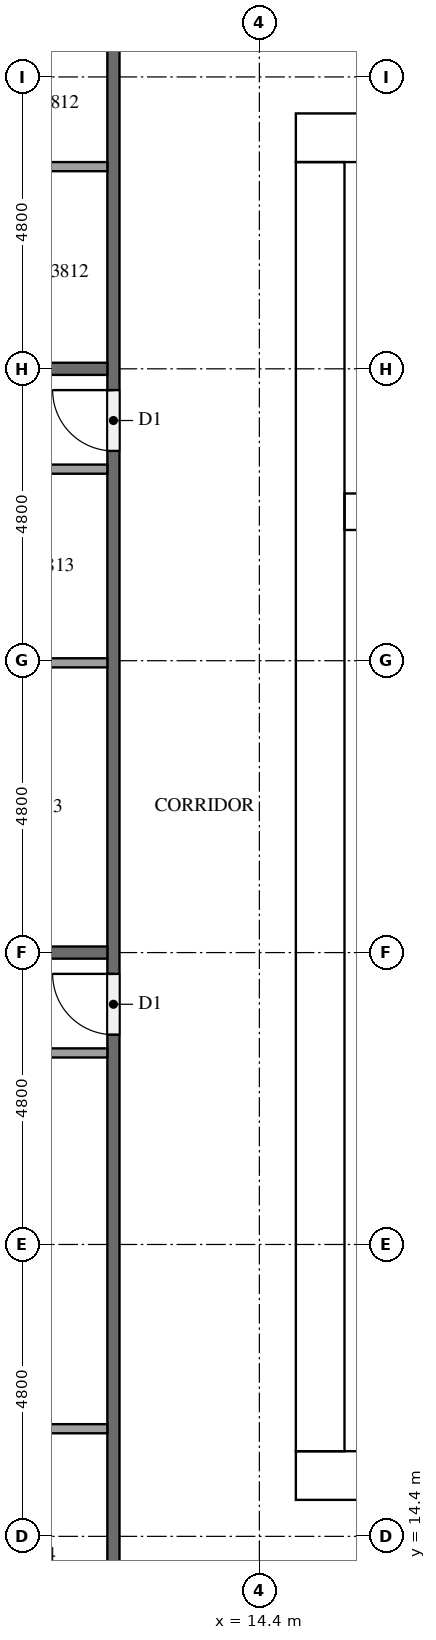
"""IFC4 building model, lengths in metres.
Left out: names, types, materials, properties, quantities, classifications, styles, units other than length and angle.
Written with IfcOpenShell. Run it as: python <this file> out.ifc"""

import sys

from ifc_helpers import new_model, si_unit, direction, frame, frame_2d, origin, place, context, subcontext, project, spatial, rectangle, extrude, element, fill, save


model = new_model("IFC4")
c1 = context("Model", 3, precision=1e-05, world=origin(), true_north=direction((0.0, 1.0)))
c2 = subcontext(c1, "Body", "Model", "MODEL_VIEW")
j1 = project(units=[si_unit("LENGTHUNIT", "METRE"), si_unit("PLANEANGLEUNIT", "RADIAN")], contexts=[c1])
p1 = place(None, origin())
s1 = spatial("IfcSite", under=j1, at=p1, CompositionType="ELEMENT")
p2 = place(p1, origin())
s2 = spatial("IfcBuilding", under=s1, at=p2, CompositionType="ELEMENT")
p3 = place(p2, frame((0.0, 0.0, 149.0)))
s3 = spatial("IfcBuildingStorey", under=s2, at=p3, CompositionType="ELEMENT", Elevation=149.0)
p4 = place(p3, frame((15.0, 15.4, 0.0), z_axis=(0.0, 0.0, 1.0), x_axis=(1.0, 0.0, 0.0)))
e1 = element("IfcWall", 1, at=p4, inside=s3, PredefinedType="SHEAR", context=c2, shape_type="SweptSolid", body=[
    extrude(rectangle(XDim=32.4, YDim=0.8, at=frame_2d((16.2, 0.0))), origin(), (0.0, 0.0, 1.0), 3.2),
])
p5 = place(p4, frame((15.3, 0.0, 0.0)))
e2 = element("IfcOpeningElement", 2, at=p5, cuts=e1, PredefinedType="OPENING", context=c2, shape_type="SweptSolid", body=[
    extrude(rectangle(XDim=1.8, YDim=2.1, at=frame_2d((0.9, 1.05))), frame((0.0, 0.41, 0.0), z_axis=(0.0, -1.0, 0.0), x_axis=(1.0, 0.0, 0.0)), (0.0, 0.0, 1.0), 0.82),
])
p6 = place(p3, frame((15.0, 37.4, 0.0), z_axis=(0.0, 0.0, 1.0), x_axis=(1.0, 0.0, 0.0)))
e3 = element("IfcWall", 3, at=p6, inside=s3, PredefinedType="SHEAR", context=c2, shape_type="SweptSolid", body=[
    extrude(rectangle(XDim=32.4, YDim=0.8, at=frame_2d((16.2, 0.0))), origin(), (0.0, 0.0, 1.0), 3.2),
])
p7 = place(p6, frame((15.3, 0.0, 0.0)))
e4 = element("IfcOpeningElement", 4, at=p7, cuts=e3, PredefinedType="OPENING", context=c2, shape_type="SweptSolid", body=[
    extrude(rectangle(XDim=1.8, YDim=2.1, at=frame_2d((0.9, 1.05))), frame((0.0, 0.41, 0.0), z_axis=(0.0, -1.0, 0.0), x_axis=(1.0, 0.0, 0.0)), (0.0, 0.0, 1.0), 0.82),
])
p8 = place(p6, frame((1.51, 0.0, 0.0)))
e5 = element("IfcOpeningElement", 5, at=p8, cuts=e3, PredefinedType="OPENING", context=c2, shape_type="SweptSolid", body=[
    extrude(rectangle(XDim=1.0, YDim=2.1, at=frame_2d((0.5, 1.05))), frame((0.0, 0.41, 0.0), z_axis=(0.0, -1.0, 0.0), x_axis=(1.0, 0.0, 0.0)), (0.0, 0.0, 1.0), 0.82),
])
p9 = place(p6, frame((5.11, 0.0, 0.0)))
e6 = element("IfcOpeningElement", 6, at=p9, cuts=e3, PredefinedType="OPENING", context=c2, shape_type="SweptSolid", body=[
    extrude(rectangle(XDim=1.0, YDim=2.1, at=frame_2d((0.5, 1.05))), frame((0.0, 0.41, 0.0), z_axis=(0.0, -1.0, 0.0), x_axis=(1.0, 0.0, 0.0)), (0.0, 0.0, 1.0), 0.82),
])
p10 = place(p3, frame((15.4, 15.8, 0.0), z_axis=(0.0, 0.0, 1.0), x_axis=(0.0, 1.0, 0.0)))
e7 = element("IfcWall", 7, at=p10, inside=s3, PredefinedType="SHEAR", context=c2, shape_type="SweptSolid", body=[
    extrude(rectangle(XDim=21.2, YDim=0.8, at=frame_2d((10.6, 0.0))), origin(), (0.0, 0.0, 1.0), 3.2),
])
p11 = place(p10, frame((4.96, 0.0, 0.0)))
e8 = element("IfcOpeningElement", 8, at=p11, cuts=e7, PredefinedType="OPENING", context=c2, shape_type="SweptSolid", body=[
    extrude(rectangle(XDim=1.2, YDim=2.1, at=frame_2d((0.6, 1.05))), frame((0.0, 0.41, 0.0), z_axis=(0.0, -1.0, 0.0), x_axis=(1.0, 0.0, 0.0)), (0.0, 0.0, 1.0), 0.82),
])
p12 = place(p3, frame((15.8, 31.25, 0.0), z_axis=(0.0, 0.0, 1.0), x_axis=(1.0, 0.0, 0.0)))
e9 = element("IfcWall", 9, at=p12, inside=s3, PredefinedType="SHEAR", context=c2, shape_type="SweptSolid", body=[
    extrude(rectangle(XDim=7.0, YDim=0.6, at=frame_2d((3.5, 0.0))), origin(), (0.0, 0.0, 1.0), 3.2),
])
p13 = place(p3, frame((12.0, 12.1, 0.0), z_axis=(0.0, 0.0, 1.0), x_axis=(0.0, 1.0, 0.0)))
e10 = element("IfcWall", 10, at=p13, inside=s3, PredefinedType="PARTITIONING", context=c2, shape_type="SweptSolid", body=[
    extrude(rectangle(XDim=28.6, YDim=0.2, at=frame_2d((14.3, 0.0))), origin(), (0.0, 0.0, 1.0), 3.2),
])
p14 = place(p13, frame((27.35, 0.0, 0.0)))
e11 = element("IfcOpeningElement", 11, at=p14, cuts=e10, PredefinedType="OPENING", context=c2, shape_type="SweptSolid", body=[
    extrude(rectangle(XDim=1.0, YDim=2.1, at=frame_2d((0.5, 1.05))), frame((0.0, 0.11, 0.0), z_axis=(0.0, -1.0, 0.0), x_axis=(1.0, 0.0, 0.0)), (0.0, 0.0, 1.0), 0.22),
])
p15 = place(p13, frame((20.15, 0.0, 0.0)))
e12 = element("IfcOpeningElement", 12, at=p15, cuts=e10, PredefinedType="OPENING", context=c2, shape_type="SweptSolid", body=[
    extrude(rectangle(XDim=1.0, YDim=2.1, at=frame_2d((0.5, 1.05))), frame((0.0, 0.11, 0.0), z_axis=(0.0, -1.0, 0.0), x_axis=(1.0, 0.0, 0.0)), (0.0, 0.0, 1.0), 0.22),
])
p16 = place(p13, frame((10.55, 0.0, 0.0)))
e13 = element("IfcOpeningElement", 13, at=p16, cuts=e10, PredefinedType="OPENING", context=c2, shape_type="SweptSolid", body=[
    extrude(rectangle(XDim=1.0, YDim=2.1, at=frame_2d((0.5, 1.05))), frame((0.0, 0.11, 0.0), z_axis=(0.0, -1.0, 0.0), x_axis=(1.0, 0.0, 0.0)), (0.0, 0.0, 1.0), 0.22),
])
for number, where, z_axis, x_axis in (
    (14, (0.375, 33.6, 0.0), (0.0, 0.0, 1.0), (1.0, 0.0, 0.0)),
    (15, (0.375, 24.0, 0.0), (0.0, 0.0, 1.0), (1.0, 0.0, 0.0)),
):
    element("IfcWall", number, at=place(p3, frame(where, z_axis=z_axis, x_axis=x_axis)), inside=s3, PredefinedType="PARTITIONING", context=c2, shape_type="SweptSolid", body=[
        extrude(rectangle(XDim=11.525, YDim=0.2, at=frame_2d((5.762, 0.0))), origin(), (0.0, 0.0, 1.0), 3.2),
    ])
p17 = place(p3, frame((11.9, 36.925, 0.0), z_axis=(0.0, 0.0, 1.0), x_axis=(-1.0, 0.0, 0.0)))
e16 = element("IfcWall", 16, at=p17, inside=s3, PredefinedType="PARTITIONING", context=c2, shape_type="SweptSolid", body=[
    extrude(rectangle(XDim=3.725, YDim=0.15, at=frame_2d((1.862, 0.0))), origin(), (0.0, 0.0, 1.0), 3.2),
])
p18 = place(p3, frame((11.9, 28.765, 0.0), z_axis=(0.0, 0.0, 1.0), x_axis=(-1.0, 0.0, 0.0)))
e17 = element("IfcWall", 17, at=p18, inside=s3, PredefinedType="PARTITIONING", context=c2, shape_type="SweptSolid", body=[
    extrude(rectangle(XDim=3.575, YDim=0.15, at=frame_2d((1.788, 0.0))), origin(), (0.0, 0.0, 1.0), 3.2),
])
p19 = place(p3, frame((11.9, 31.95, 0.0), z_axis=(0.0, 0.0, 1.0), x_axis=(-1.0, 0.0, 0.0)))
e18 = element("IfcWall", 18, at=p19, inside=s3, PredefinedType="PARTITIONING", context=c2, shape_type="SweptSolid", body=[
    extrude(rectangle(XDim=3.725, YDim=0.15, at=frame_2d((1.862, 0.0))), origin(), (0.0, 0.0, 1.0), 3.2),
])
p20 = place(p3, frame((11.9, 16.17, 0.0), z_axis=(0.0, 0.0, 1.0), x_axis=(-1.0, 0.0, 0.0)))
e19 = element("IfcWall", 19, at=p20, inside=s3, PredefinedType="PARTITIONING", context=c2, shape_type="SweptSolid", body=[
    extrude(rectangle(XDim=4.175, YDim=0.15, at=frame_2d((2.087, 0.0))), origin(), (0.0, 0.0, 1.0), 3.2),
])
p21 = place(p3, frame((11.9, 22.35, 0.0), z_axis=(0.0, 0.0, 1.0), x_axis=(-1.0, 0.0, 0.0)))
e20 = element("IfcWall", 20, at=p21, inside=s3, PredefinedType="PARTITIONING", context=c2, shape_type="SweptSolid", body=[
    extrude(rectangle(XDim=4.325, YDim=0.15, at=frame_2d((2.163, 0.0))), origin(), (0.0, 0.0, 1.0), 3.2),
])
p22 = place(p11, frame((1.2, 0.0, 0.0), z_axis=(0.0, 0.0, 1.0), x_axis=(-1.0, 0.0, 0.0)))
e21 = element("IfcDoor", 21, at=p22, inside=s3, OperationType="SINGLE_SWING_LEFT", PredefinedType="DOOR", context=c2, shape_type="SweptSolid", body=[
    extrude(rectangle(XDim=1.2, YDim=2.1, at=frame_2d((0.6, 1.05))), frame((0.0, 0.025, 0.0), z_axis=(0.0, -1.0, 0.0), x_axis=(1.0, 0.0, 0.0)), (0.0, 0.0, 1.0), 0.05),
])
fill(e8, e21)
p23 = place(p15, origin())
e22 = element("IfcDoor", 22, at=p23, inside=s3, OperationType="SINGLE_SWING_RIGHT", PredefinedType="DOOR", context=c2, shape_type="SweptSolid", body=[
    extrude(rectangle(XDim=1.0, YDim=2.1, at=frame_2d((0.5, 1.05))), frame((0.0, 0.025, 0.0), z_axis=(0.0, -1.0, 0.0), x_axis=(1.0, 0.0, 0.0)), (0.0, 0.0, 1.0), 0.05),
])
fill(e12, e22)
p24 = place(p16, origin())
e23 = element("IfcDoor", 23, at=p24, inside=s3, OperationType="SINGLE_SWING_RIGHT", PredefinedType="DOOR", context=c2, shape_type="SweptSolid", body=[
    extrude(rectangle(XDim=1.0, YDim=2.1, at=frame_2d((0.5, 1.05))), frame((0.0, 0.025, 0.0), z_axis=(0.0, -1.0, 0.0), x_axis=(1.0, 0.0, 0.0)), (0.0, 0.0, 1.0), 0.05),
])
fill(e13, e23)
save(model, sys.argv[1])
